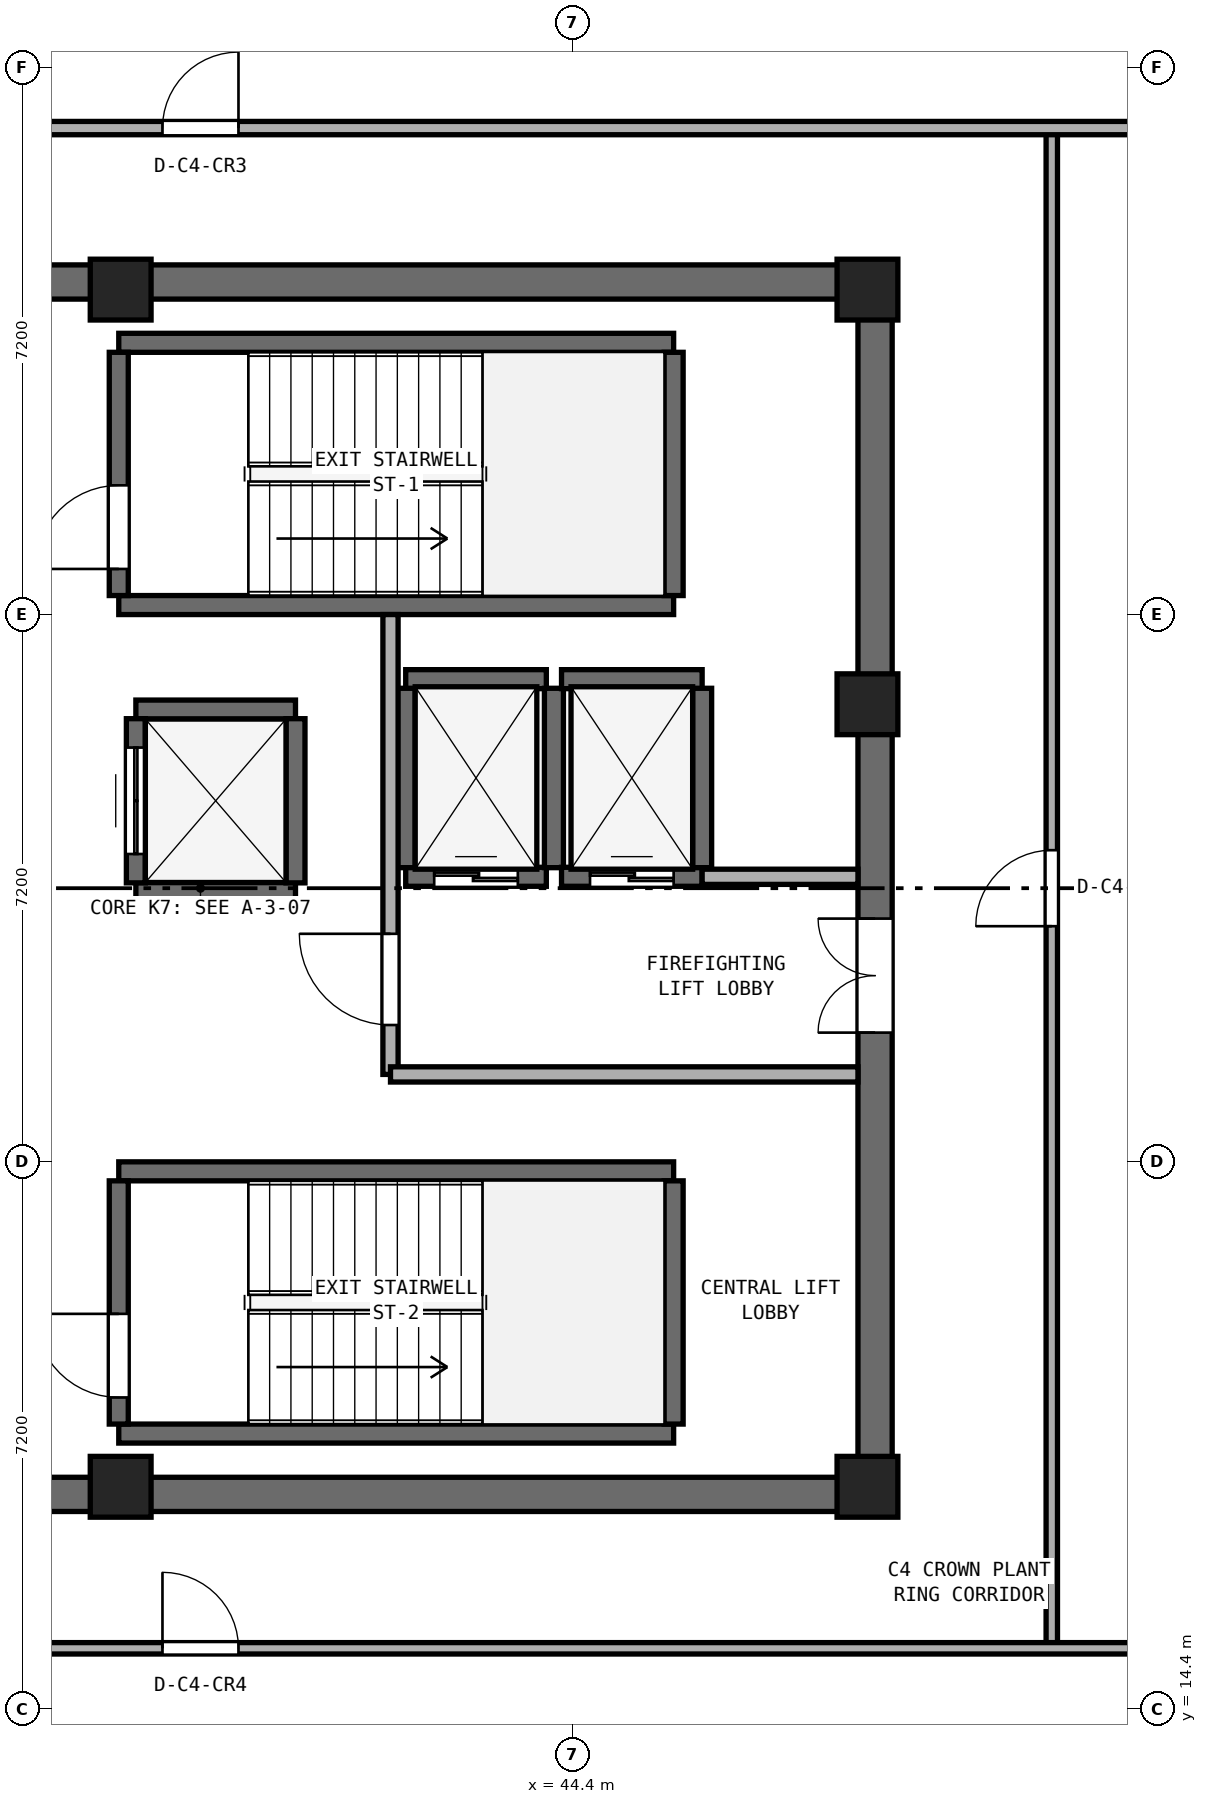
"""IFC4 building model, lengths in metres.
Left out: names, types, materials, properties, quantities, classifications, styles, units other than length and angle.
Written with IfcOpenShell. Run it as: python <this file> out.ifc"""

import sys

from ifc_helpers import new_model, si_unit, direction, frame, frame_2d, origin, origin_2d, place, context, subcontext, project, spatial, rectangle, extrude, element, fill, save


model = new_model("IFC4")
c1 = context("Model", 3, precision=1e-05, world=origin(), true_north=direction((0.0, 1.0)))
c2 = subcontext(c1, "Body", "Model", "MODEL_VIEW")
j1 = project(units=[si_unit("LENGTHUNIT", "METRE"), si_unit("PLANEANGLEUNIT", "RADIAN")], contexts=[c1])
p1 = place(None, origin())
s1 = spatial("IfcSite", under=j1, at=p1, CompositionType="ELEMENT")
p2 = place(p1, origin())
s2 = spatial("IfcBuilding", under=s1, at=p2, CompositionType="ELEMENT")
p3 = place(p2, frame((0.0, 0.0, 325.4)))
s3 = spatial("IfcBuildingStorey", under=s2, at=p3, CompositionType="ELEMENT", Elevation=325.4)
for number, where, z_axis, x_axis in (
    (1, (30.4, 17.225, 0.0), (0.0, 0.0, 1.0), (1.0, 0.0, 0.0)),
    (2, (30.4, 33.175, 0.0), (0.0, 0.0, 1.0), (1.0, 0.0, 0.0)),
):
    element("IfcWall", number, at=place(p3, frame(where, z_axis=z_axis, x_axis=x_axis)), inside=s3, PredefinedType="SHEAR", context=c2, shape_type="SweptSolid", body=[
        extrude(rectangle(XDim=18.2, YDim=0.45, at=frame_2d((9.1, 0.0))), origin(), (0.0, 0.0, 1.0), 3.72),
    ])
p4 = place(p3, frame((48.375, 17.45, 0.0), z_axis=(0.0, 0.0, 1.0), x_axis=(0.0, 1.0, 0.0)))
e3 = element("IfcWall", 3, at=p4, inside=s3, PredefinedType="SHEAR", context=c2, shape_type="SweptSolid", body=[
    extrude(rectangle(XDim=15.5, YDim=0.45, at=frame_2d((7.75, 0.0))), origin(), (0.0, 0.0, 1.0), 3.72),
])
p5 = place(p4, frame((5.85, 0.0, 0.0)))
e4 = element("IfcOpeningElement", 4, at=p5, cuts=e3, PredefinedType="OPENING", context=c2, shape_type="SweptSolid", body=[
    extrude(rectangle(XDim=1.5, YDim=2.15, at=frame_2d((0.75, 1.075))), frame((0.0, 0.235, 0.0), z_axis=(0.0, -1.0, 0.0), x_axis=(1.0, 0.0, 0.0)), (0.0, 0.0, 1.0), 0.47),
])
for number, where, z_axis, x_axis in (
    (5, (38.45, 17.325, 0.0), (0.0, 0.0, 1.0), (1.0, 0.0, 0.0)),
    (6, (48.275, 17.325, 0.0), (0.0, 0.0, 1.0), (1.0, 0.0, 0.0)),
    (7, (48.275, 27.62, 0.0), (0.0, 0.0, 1.0), (1.0, 0.0, 0.0)),
    (8, (48.275, 33.075, 0.0), (0.0, 0.0, 1.0), (1.0, 0.0, 0.0)),
    (9, (38.45, 33.075, 0.0), (0.0, 0.0, 1.0), (1.0, 0.0, 0.0)),
):
    element("IfcColumn", number, at=place(p3, frame(where, z_axis=z_axis, x_axis=x_axis)), inside=s3, PredefinedType="PILASTER", context=c2, shape_type="SweptSolid", body=[
        extrude(rectangle(XDim=0.8, YDim=0.8, at=origin_2d()), origin(), (0.0, 0.0, 1.0), 4.0),
    ])
for number, where, z_axis, x_axis in (
    (10, (38.425, 28.925, 0.0), (0.0, 0.0, 1.0), (1.0, 0.0, 0.0)),
    (11, (38.425, 32.375, 0.0), (0.0, 0.0, 1.0), (1.0, 0.0, 0.0)),
):
    element("IfcWall", number, at=place(p3, frame(where, z_axis=z_axis, x_axis=x_axis)), inside=s3, PredefinedType="SHEAR", context=c2, shape_type="SweptSolid", body=[
        extrude(rectangle(XDim=7.3, YDim=0.25, at=frame_2d((3.65, 0.0))), origin(), (0.0, 0.0, 1.0), 3.72),
    ])
p6 = place(p3, frame((38.425, 29.05, 0.0), z_axis=(0.0, 0.0, 1.0), x_axis=(0.0, 1.0, 0.0)))
e12 = element("IfcWall", 12, at=p6, inside=s3, PredefinedType="SHEAR", context=c2, shape_type="SweptSolid", body=[
    extrude(rectangle(XDim=3.2, YDim=0.25, at=frame_2d((1.6, 0.0))), origin(), (0.0, 0.0, 1.0), 3.72),
])
p7 = place(p6, frame((0.35, 0.0, 0.0)))
e13 = element("IfcOpeningElement", 13, at=p7, cuts=e12, PredefinedType="OPENING", context=c2, shape_type="SweptSolid", body=[
    extrude(rectangle(XDim=1.1, YDim=2.15, at=frame_2d((0.55, 1.075))), frame((0.0, 0.135, 0.0), z_axis=(0.0, -1.0, 0.0), x_axis=(1.0, 0.0, 0.0)), (0.0, 0.0, 1.0), 0.27),
])
p8 = place(p3, frame((45.725, 29.05, 0.0), z_axis=(0.0, 0.0, 1.0), x_axis=(0.0, 1.0, 0.0)))
e14 = element("IfcWall", 14, at=p8, inside=s3, PredefinedType="SHEAR", context=c2, shape_type="SweptSolid", body=[
    extrude(rectangle(XDim=3.2, YDim=0.25, at=frame_2d((1.6, 0.0))), origin(), (0.0, 0.0, 1.0), 3.72),
])
for number, where, z_axis, x_axis in (
    (15, (38.425, 18.025, 0.0), (0.0, 0.0, 1.0), (1.0, 0.0, 0.0)),
    (16, (38.425, 21.475, 0.0), (0.0, 0.0, 1.0), (1.0, 0.0, 0.0)),
):
    element("IfcWall", number, at=place(p3, frame(where, z_axis=z_axis, x_axis=x_axis)), inside=s3, PredefinedType="SHEAR", context=c2, shape_type="SweptSolid", body=[
        extrude(rectangle(XDim=7.3, YDim=0.25, at=frame_2d((3.65, 0.0))), origin(), (0.0, 0.0, 1.0), 3.72),
    ])
p9 = place(p3, frame((38.425, 18.15, 0.0), z_axis=(0.0, 0.0, 1.0), x_axis=(0.0, 1.0, 0.0)))
e17 = element("IfcWall", 17, at=p9, inside=s3, PredefinedType="SHEAR", context=c2, shape_type="SweptSolid", body=[
    extrude(rectangle(XDim=3.2, YDim=0.25, at=frame_2d((1.6, 0.0))), origin(), (0.0, 0.0, 1.0), 3.72),
])
p10 = place(p9, frame((0.35, 0.0, 0.0)))
e18 = element("IfcOpeningElement", 18, at=p10, cuts=e17, PredefinedType="OPENING", context=c2, shape_type="SweptSolid", body=[
    extrude(rectangle(XDim=1.1, YDim=2.15, at=frame_2d((0.55, 1.075))), frame((0.0, 0.135, 0.0), z_axis=(0.0, -1.0, 0.0), x_axis=(1.0, 0.0, 0.0)), (0.0, 0.0, 1.0), 0.27),
])
p11 = place(p3, frame((45.725, 18.15, 0.0), z_axis=(0.0, 0.0, 1.0), x_axis=(0.0, 1.0, 0.0)))
e19 = element("IfcWall", 19, at=p11, inside=s3, PredefinedType="SHEAR", context=c2, shape_type="SweptSolid", body=[
    extrude(rectangle(XDim=3.2, YDim=0.25, at=frame_2d((1.6, 0.0))), origin(), (0.0, 0.0, 1.0), 3.72),
])
p12 = place(p3, frame((42.2, 25.35, 0.0), z_axis=(0.0, 0.0, 1.0), x_axis=(1.0, 0.0, 0.0)))
e20 = element("IfcWall", 20, at=p12, inside=s3, PredefinedType="SHEAR", context=c2, shape_type="SweptSolid", body=[
    extrude(rectangle(XDim=1.85, YDim=0.25, at=frame_2d((0.925, 0.0))), origin(), (0.0, 0.0, 1.0), 3.72),
])
p13 = place(p12, frame((0.375, 0.0, 0.0)))
e21 = element("IfcOpeningElement", 21, at=p13, cuts=e20, PredefinedType="OPENING", context=c2, shape_type="SweptSolid", body=[
    extrude(rectangle(XDim=1.1, YDim=2.15, at=frame_2d((0.55, 1.075))), frame((0.0, 0.135, 0.0), z_axis=(0.0, -1.0, 0.0), x_axis=(1.0, 0.0, 0.0)), (0.0, 0.0, 1.0), 0.27),
])
p14 = place(p3, frame((42.2, 27.95, 0.0), z_axis=(0.0, 0.0, 1.0), x_axis=(1.0, 0.0, 0.0)))
e22 = element("IfcWall", 22, at=p14, inside=s3, PredefinedType="SHEAR", context=c2, shape_type="SweptSolid", body=[
    extrude(rectangle(XDim=1.85, YDim=0.25, at=frame_2d((0.925, 0.0))), origin(), (0.0, 0.0, 1.0), 3.72),
])
for number, where, z_axis, x_axis in (
    (23, (42.2, 25.47, 0.0), (0.0, 0.0, 1.0), (0.0, 1.0, 0.0)),
    (24, (44.15, 25.47, 0.0), (0.0, 0.0, 1.0), (0.0, 1.0, 0.0)),
):
    element("IfcWall", number, at=place(p3, frame(where, z_axis=z_axis, x_axis=x_axis)), inside=s3, PredefinedType="SHEAR", context=c2, shape_type="SweptSolid", body=[
        extrude(rectangle(XDim=2.36, YDim=0.25, at=frame_2d((1.18, 0.0))), origin(), (0.0, 0.0, 1.0), 3.72),
    ])
p15 = place(p3, frame((44.25, 25.35, 0.0), z_axis=(0.0, 0.0, 1.0), x_axis=(1.0, 0.0, 0.0)))
e25 = element("IfcWall", 25, at=p15, inside=s3, PredefinedType="SHEAR", context=c2, shape_type="SweptSolid", body=[
    extrude(rectangle(XDim=1.85, YDim=0.25, at=frame_2d((0.925, 0.0))), origin(), (0.0, 0.0, 1.0), 3.72),
])
p16 = place(p15, frame((0.375, 0.0, 0.0)))
e26 = element("IfcOpeningElement", 26, at=p16, cuts=e25, PredefinedType="OPENING", context=c2, shape_type="SweptSolid", body=[
    extrude(rectangle(XDim=1.1, YDim=2.15, at=frame_2d((0.55, 1.075))), frame((0.0, 0.135, 0.0), z_axis=(0.0, -1.0, 0.0), x_axis=(1.0, 0.0, 0.0)), (0.0, 0.0, 1.0), 0.27),
])
p17 = place(p3, frame((44.25, 27.95, 0.0), z_axis=(0.0, 0.0, 1.0), x_axis=(1.0, 0.0, 0.0)))
e27 = element("IfcWall", 27, at=p17, inside=s3, PredefinedType="SHEAR", context=c2, shape_type="SweptSolid", body=[
    extrude(rectangle(XDim=1.85, YDim=0.25, at=frame_2d((0.925, 0.0))), origin(), (0.0, 0.0, 1.0), 3.72),
])
p18 = place(p3, frame((46.1, 25.47, 0.0), z_axis=(0.0, 0.0, 1.0), x_axis=(0.0, 1.0, 0.0)))
e28 = element("IfcWall", 28, at=p18, inside=s3, PredefinedType="SHEAR", context=c2, shape_type="SweptSolid", body=[
    extrude(rectangle(XDim=2.36, YDim=0.25, at=frame_2d((1.18, 0.0))), origin(), (0.0, 0.0, 1.0), 3.72),
])
for number, where, z_axis, x_axis in (
    (29, (38.65, 25.15, 0.0), (0.0, 0.0, 1.0), (1.0, 0.0, 0.0)),
    (30, (38.65, 27.55, 0.0), (0.0, 0.0, 1.0), (1.0, 0.0, 0.0)),
):
    element("IfcWall", number, at=place(p3, frame(where, z_axis=z_axis, x_axis=x_axis)), inside=s3, PredefinedType="SHEAR", context=c2, shape_type="SweptSolid", body=[
        extrude(rectangle(XDim=2.1, YDim=0.25, at=frame_2d((1.05, 0.0))), origin(), (0.0, 0.0, 1.0), 3.72),
    ])
p19 = place(p3, frame((38.65, 25.27, 0.0), z_axis=(0.0, 0.0, 1.0), x_axis=(0.0, 1.0, 0.0)))
e31 = element("IfcWall", 31, at=p19, inside=s3, PredefinedType="SHEAR", context=c2, shape_type="SweptSolid", body=[
    extrude(rectangle(XDim=2.16, YDim=0.25, at=frame_2d((1.08, 0.0))), origin(), (0.0, 0.0, 1.0), 3.72),
])
p20 = place(p19, frame((0.38, 0.0, 0.0)))
e32 = element("IfcOpeningElement", 32, at=p20, cuts=e31, PredefinedType="OPENING", context=c2, shape_type="SweptSolid", body=[
    extrude(rectangle(XDim=1.4, YDim=2.2, at=frame_2d((0.7, 1.1))), frame((0.0, 0.135, 0.0), z_axis=(0.0, -1.0, 0.0), x_axis=(1.0, 0.0, 0.0)), (0.0, 0.0, 1.0), 0.27),
])
p21 = place(p3, frame((40.75, 25.27, 0.0), z_axis=(0.0, 0.0, 1.0), x_axis=(0.0, 1.0, 0.0)))
e33 = element("IfcWall", 33, at=p21, inside=s3, PredefinedType="SHEAR", context=c2, shape_type="SweptSolid", body=[
    extrude(rectangle(XDim=2.16, YDim=0.25, at=frame_2d((1.08, 0.0))), origin(), (0.0, 0.0, 1.0), 3.72),
])
p22 = place(p3, frame((42.0, 22.75, 0.0), z_axis=(0.0, 0.0, 1.0), x_axis=(0.0, 1.0, 0.0)))
e34 = element("IfcWall", 34, at=p22, inside=s3, PredefinedType="SOLIDWALL", context=c2, shape_type="SweptSolid", body=[
    extrude(rectangle(XDim=6.05, YDim=0.2, at=frame_2d((3.025, 0.0))), origin(), (0.0, 0.0, 1.0), 3.72),
])
p23 = place(p22, frame((0.65, 0.0, 0.0)))
e35 = element("IfcOpeningElement", 35, at=p23, cuts=e34, PredefinedType="OPENING", context=c2, shape_type="SweptSolid", body=[
    extrude(rectangle(XDim=1.2, YDim=2.15, at=frame_2d((0.6, 1.075))), frame((0.0, 0.11, 0.0), z_axis=(0.0, -1.0, 0.0), x_axis=(1.0, 0.0, 0.0)), (0.0, 0.0, 1.0), 0.22),
])
p24 = place(p3, frame((42.0, 22.75, 0.0), z_axis=(0.0, 0.0, 1.0), x_axis=(1.0, 0.0, 0.0)))
e36 = element("IfcWall", 36, at=p24, inside=s3, PredefinedType="SOLIDWALL", context=c2, shape_type="SweptSolid", body=[
    extrude(rectangle(XDim=6.15, YDim=0.2, at=frame_2d((3.075, 0.0))), origin(), (0.0, 0.0, 1.0), 3.72),
])
p25 = place(p3, frame((46.1, 25.35, 0.0), z_axis=(0.0, 0.0, 1.0), x_axis=(1.0, 0.0, 0.0)))
e37 = element("IfcWall", 37, at=p25, inside=s3, PredefinedType="SOLIDWALL", context=c2, shape_type="SweptSolid", body=[
    extrude(rectangle(XDim=2.05, YDim=0.2, at=frame_2d((1.025, 0.0))), origin(), (0.0, 0.0, 1.0), 3.72),
])
p26 = place(p3, frame((50.7, 15.2, 0.0), z_axis=(0.0, 0.0, 1.0), x_axis=(0.0, 1.0, 0.0)))
e38 = element("IfcWall", 38, at=p26, inside=s3, PredefinedType="PARTITIONING", context=c2, shape_type="SweptSolid", body=[
    extrude(rectangle(XDim=20.0, YDim=0.15, at=frame_2d((10.0, 0.0))), origin(), (0.0, 0.0, 1.0), 3.72),
])
p27 = place(p26, frame((9.5, 0.0, 0.0)))
e39 = element("IfcOpeningElement", 39, at=p27, cuts=e38, PredefinedType="OPENING", context=c2, shape_type="SweptSolid", body=[
    extrude(rectangle(XDim=1.0, YDim=2.12, at=frame_2d((0.5, 1.06))), frame((0.0, 0.085, 0.0), z_axis=(0.0, -1.0, 0.0), x_axis=(1.0, 0.0, 0.0)), (0.0, 0.0, 1.0), 0.17),
])
p28 = place(p3, frame((24.464, 15.2, 0.0), z_axis=(0.0, 0.0, 1.0), x_axis=(1.0, 0.0, 0.0)))
e40 = element("IfcWall", 40, at=p28, inside=s3, PredefinedType="PARTITIONING", context=c2, shape_type="SweptSolid", body=[
    extrude(rectangle(XDim=30.765, YDim=0.15, at=frame_2d((15.383, 0.0))), origin(), (0.0, 0.0, 1.0), 3.72),
])
p29 = place(p28, frame((14.536, 0.0, 0.0)))
e41 = element("IfcOpeningElement", 41, at=p29, cuts=e40, PredefinedType="OPENING", context=c2, shape_type="SweptSolid", body=[
    extrude(rectangle(XDim=1.0, YDim=2.12, at=frame_2d((0.5, 1.06))), frame((0.0, 0.085, 0.0), z_axis=(0.0, -1.0, 0.0), x_axis=(1.0, 0.0, 0.0)), (0.0, 0.0, 1.0), 0.17),
])
p30 = place(p3, frame((25.074, 35.2, 0.0), z_axis=(0.0, 0.0, 1.0), x_axis=(1.0, 0.0, 0.0)))
e42 = element("IfcWall", 42, at=p30, inside=s3, PredefinedType="PARTITIONING", context=c2, shape_type="SweptSolid", body=[
    extrude(rectangle(XDim=31.228, YDim=0.175, at=frame_2d((15.614, 0.0))), origin(), (0.0, 0.0, 1.0), 3.72),
])
p31 = place(p30, frame((13.926, 0.0, 0.0)))
e43 = element("IfcOpeningElement", 43, at=p31, cuts=e42, PredefinedType="OPENING", context=c2, shape_type="SweptSolid", body=[
    extrude(rectangle(XDim=1.0, YDim=2.12, at=frame_2d((0.5, 1.06))), frame((0.0, 0.097, 0.0), z_axis=(0.0, -1.0, 0.0), x_axis=(1.0, 0.0, 0.0)), (0.0, 0.0, 1.0), 0.195),
])
p32 = place(p3, frame((47.371, 8.558, 0.0), z_axis=(0.0, 0.0, 1.0), x_axis=(0.760637685394, 0.649176641261, 0.0)))
e44 = element("IfcWall", 44, at=p32, inside=s3, PredefinedType="STANDARD", context=c2, shape_type="SweptSolid", body=[
    extrude(rectangle(XDim=11.852, YDim=0.28, at=frame_2d((5.926, 0.0))), origin(), (0.0, 0.0, 1.0), 3.72),
])
p33 = place(p32, frame((1.509, 0.0, 0.9)))
e45 = element("IfcOpeningElement", 45, at=p33, cuts=e44, PredefinedType="OPENING", context=c2, shape_type="SweptSolid", body=[
    extrude(rectangle(XDim=1.6, YDim=1.45, at=frame_2d((0.8, 0.725))), frame((0.0, 0.15, 0.0), z_axis=(0.0, -1.0, 0.0), x_axis=(1.0, 0.0, 0.0)), (0.0, 0.0, 1.0), 0.3),
])
p34 = place(p32, frame((5.126, 0.0, 0.9)))
e46 = element("IfcOpeningElement", 46, at=p34, cuts=e44, PredefinedType="OPENING", context=c2, shape_type="SweptSolid", body=[
    extrude(rectangle(XDim=1.6, YDim=1.45, at=frame_2d((0.8, 0.725))), frame((0.0, 0.15, 0.0), z_axis=(0.0, -1.0, 0.0), x_axis=(1.0, 0.0, 0.0)), (0.0, 0.0, 1.0), 0.3),
])
p35 = place(p3, frame((56.25, 35.201, 0.0), z_axis=(0.0, 0.0, 1.0), x_axis=(-0.796694895732, 0.60438170316, 0.0)))
e47 = element("IfcWall", 47, at=p35, inside=s3, PredefinedType="STANDARD", context=c2, shape_type="SweptSolid", body=[
    extrude(rectangle(XDim=11.183, YDim=0.28, at=frame_2d((5.591, 0.0))), origin(), (0.0, 0.0, 1.0), 3.72),
])
p36 = place(p35, frame((1.397, 0.0, 0.9)))
e48 = element("IfcOpeningElement", 48, at=p36, cuts=e47, PredefinedType="OPENING", context=c2, shape_type="SweptSolid", body=[
    extrude(rectangle(XDim=1.6, YDim=1.45, at=frame_2d((0.8, 0.725))), frame((0.0, 0.15, 0.0), z_axis=(0.0, -1.0, 0.0), x_axis=(1.0, 0.0, 0.0)), (0.0, 0.0, 1.0), 0.3),
])
p37 = place(p35, frame((4.792, 0.0, 0.9)))
e49 = element("IfcOpeningElement", 49, at=p37, cuts=e47, PredefinedType="OPENING", context=c2, shape_type="SweptSolid", body=[
    extrude(rectangle(XDim=1.6, YDim=1.45, at=frame_2d((0.8, 0.725))), frame((0.0, 0.15, 0.0), z_axis=(0.0, -1.0, 0.0), x_axis=(1.0, 0.0, 0.0)), (0.0, 0.0, 1.0), 0.3),
])
p38 = place(p35, frame((8.186, 0.0, 0.9)))
e50 = element("IfcOpeningElement", 50, at=p38, cuts=e47, PredefinedType="OPENING", context=c2, shape_type="SweptSolid", body=[
    extrude(rectangle(XDim=1.6, YDim=1.45, at=frame_2d((0.8, 0.725))), frame((0.0, 0.15, 0.0), z_axis=(0.0, -1.0, 0.0), x_axis=(1.0, 0.0, 0.0)), (0.0, 0.0, 1.0), 0.3),
])
p39 = place(p7, origin())
e51 = element("IfcDoor", 51, at=p39, inside=s3, OperationType="SINGLE_SWING_LEFT", PredefinedType="DOOR", context=c2, shape_type="SweptSolid", body=[
    extrude(rectangle(XDim=1.1, YDim=2.15, at=frame_2d((0.55, 1.075))), frame((0.0, 0.025, 0.0), z_axis=(0.0, -1.0, 0.0), x_axis=(1.0, 0.0, 0.0)), (0.0, 0.0, 1.0), 0.05),
])
fill(e13, e51)
p40 = place(p10, origin())
e52 = element("IfcDoor", 52, at=p40, inside=s3, OperationType="SINGLE_SWING_RIGHT", PredefinedType="DOOR", context=c2, shape_type="SweptSolid", body=[
    extrude(rectangle(XDim=1.1, YDim=2.15, at=frame_2d((0.55, 1.075))), frame((0.0, 0.025, 0.0), z_axis=(0.0, -1.0, 0.0), x_axis=(1.0, 0.0, 0.0)), (0.0, 0.0, 1.0), 0.05),
])
fill(e18, e52)
p41 = place(p13, origin())
e53 = element("IfcDoor", 53, at=p41, inside=s3, OperationType="DOUBLE_DOOR_SLIDING", PredefinedType="DOOR", context=c2, shape_type="SweptSolid", body=[
    extrude(rectangle(XDim=1.1, YDim=2.15, at=frame_2d((0.55, 1.075))), frame((0.0, 0.025, 0.0), z_axis=(0.0, -1.0, 0.0), x_axis=(1.0, 0.0, 0.0)), (0.0, 0.0, 1.0), 0.05),
])
fill(e21, e53)
p42 = place(p16, origin())
e54 = element("IfcDoor", 54, at=p42, inside=s3, OperationType="DOUBLE_DOOR_SLIDING", PredefinedType="DOOR", context=c2, shape_type="SweptSolid", body=[
    extrude(rectangle(XDim=1.1, YDim=2.15, at=frame_2d((0.55, 1.075))), frame((0.0, 0.025, 0.0), z_axis=(0.0, -1.0, 0.0), x_axis=(1.0, 0.0, 0.0)), (0.0, 0.0, 1.0), 0.05),
])
fill(e26, e54)
p43 = place(p20, origin())
e55 = element("IfcDoor", 55, at=p43, inside=s3, OperationType="DOUBLE_DOOR_SLIDING", PredefinedType="DOOR", context=c2, shape_type="SweptSolid", body=[
    extrude(rectangle(XDim=1.4, YDim=2.2, at=frame_2d((0.7, 1.1))), frame((0.0, 0.025, 0.0), z_axis=(0.0, -1.0, 0.0), x_axis=(1.0, 0.0, 0.0)), (0.0, 0.0, 1.0), 0.05),
])
fill(e32, e55)
p44 = place(p23, origin())
e56 = element("IfcDoor", 56, at=p44, inside=s3, OperationType="SINGLE_SWING_RIGHT", PredefinedType="DOOR", context=c2, shape_type="SweptSolid", body=[
    extrude(rectangle(XDim=1.2, YDim=2.15, at=frame_2d((0.6, 1.075))), frame((0.0, 0.025, 0.0), z_axis=(0.0, -1.0, 0.0), x_axis=(1.0, 0.0, 0.0)), (0.0, 0.0, 1.0), 0.05),
])
fill(e35, e56)
p45 = place(p5, origin())
e57 = element("IfcDoor", 57, at=p45, inside=s3, OperationType="DOUBLE_DOOR_SINGLE_SWING", PredefinedType="DOOR", context=c2, shape_type="SweptSolid", body=[
    extrude(rectangle(XDim=1.5, YDim=2.15, at=frame_2d((0.75, 1.075))), frame((0.0, 0.025, 0.0), z_axis=(0.0, -1.0, 0.0), x_axis=(1.0, 0.0, 0.0)), (0.0, 0.0, 1.0), 0.05),
])
fill(e4, e57)
p46 = place(p27, origin())
e58 = element("IfcDoor", 58, at=p46, inside=s3, OperationType="SINGLE_SWING_LEFT", PredefinedType="DOOR", context=c2, shape_type="SweptSolid", body=[
    extrude(rectangle(XDim=1.0, YDim=2.12, at=frame_2d((0.5, 1.06))), frame((0.0, 0.025, 0.0), z_axis=(0.0, -1.0, 0.0), x_axis=(1.0, 0.0, 0.0)), (0.0, 0.0, 1.0), 0.05),
])
fill(e39, e58)
p47 = place(p31, origin())
e59 = element("IfcDoor", 59, at=p47, inside=s3, OperationType="SINGLE_SWING_RIGHT", PredefinedType="DOOR", context=c2, shape_type="SweptSolid", body=[
    extrude(rectangle(XDim=1.0, YDim=2.12, at=frame_2d((0.5, 1.06))), frame((0.0, 0.025, 0.0), z_axis=(0.0, -1.0, 0.0), x_axis=(1.0, 0.0, 0.0)), (0.0, 0.0, 1.0), 0.05),
])
fill(e43, e59)
p48 = place(p29, origin())
e60 = element("IfcDoor", 60, at=p48, inside=s3, OperationType="SINGLE_SWING_LEFT", PredefinedType="DOOR", context=c2, shape_type="SweptSolid", body=[
    extrude(rectangle(XDim=1.0, YDim=2.12, at=frame_2d((0.5, 1.06))), frame((0.0, 0.025, 0.0), z_axis=(0.0, -1.0, 0.0), x_axis=(1.0, 0.0, 0.0)), (0.0, 0.0, 1.0), 0.05),
])
fill(e41, e60)
save(model, sys.argv[1])
